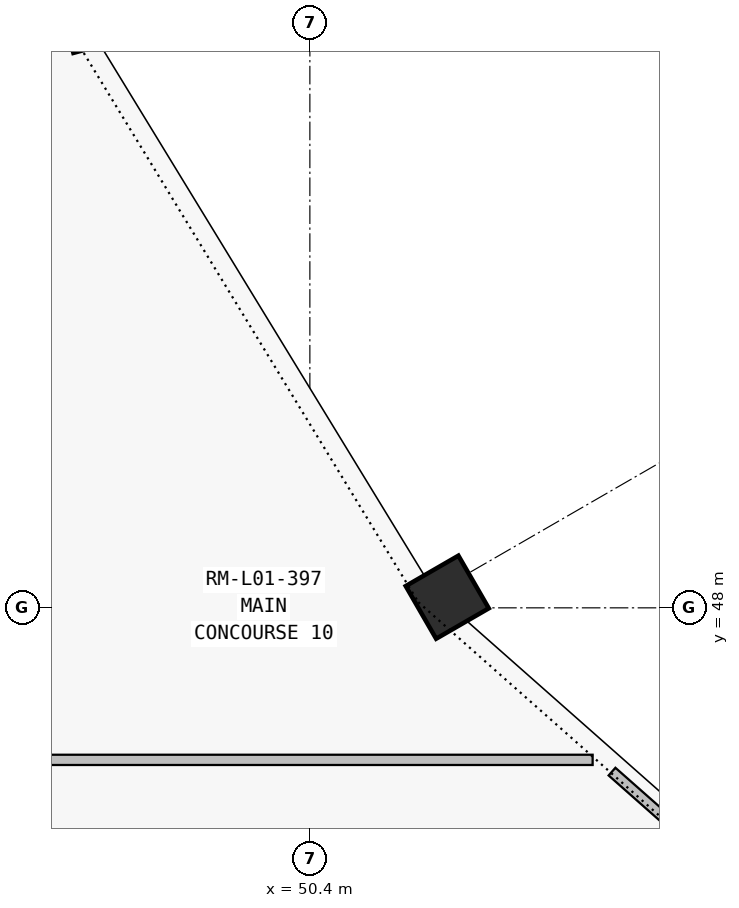
"""IFC4 building model, lengths in metres.
Left out: names, types, materials, properties, quantities, classifications, styles, units other than length and angle.
Written with IfcOpenShell. Run it as: python <this file> out.ifc"""

import sys

from ifc_helpers import new_model, si_unit, direction, frame, frame_2d, origin, origin_2d, place, context, subcontext, project, spatial, rectangle, extrude, element, save


model = new_model("IFC4")
c1 = context("Model", 3, precision=1e-05, world=origin(), true_north=direction((0.0, 1.0)))
c2 = subcontext(c1, "Body", "Model", "MODEL_VIEW")
j1 = project(units=[si_unit("LENGTHUNIT", "METRE"), si_unit("PLANEANGLEUNIT", "RADIAN")], contexts=[c1])
p1 = place(None, origin())
s1 = spatial("IfcSite", under=j1, at=p1, CompositionType="ELEMENT")
p2 = place(p1, origin())
s2 = spatial("IfcBuilding", under=s1, at=p2, CompositionType="ELEMENT")
p3 = place(p2, frame((0.0, 0.0, 5.4)))
s3 = spatial("IfcBuildingStorey", under=s2, at=p3, CompositionType="ELEMENT", Elevation=5.4)
for number, where, z_axis, x_axis in (
    (1, (47.571, 55.79, 0.0), (0.0, 0.0, 1.0), (-0.966, -0.259, 0.0)),
    (2, (52.208, 48.14, 0.0), (0.0, 0.0, 1.0), (-0.866, -0.5, 0.0)),
):
    element("IfcColumn", number, at=place(p3, frame(where, z_axis=z_axis, x_axis=x_axis)), inside=s3, PredefinedType="COLUMN", context=c2, shape_type="SweptSolid", body=[
        extrude(rectangle(XDim=0.8, YDim=0.8, at=origin_2d()), origin(), (0.0, 0.0, 1.0), 4.5),
    ])
p4 = place(p3, frame((46.685, 46.0, 0.0), z_axis=(0.0, 0.0, 1.0), x_axis=(1.0, 0.0, 0.0)))
e3 = element("IfcWall", 3, at=p4, inside=s3, PredefinedType="PARTITIONING", context=c2, shape_type="SweptSolid", body=[
    extrude(rectangle(XDim=7.436, YDim=0.135, at=frame_2d((3.718, 0.0))), origin(), (0.0, 0.0, 1.0), 3.682),
])
p5 = place(p3, frame((54.375, 45.845, 0.0), z_axis=(0.0, 0.0, 1.0), x_axis=(0.749487139649, -0.662018902677, 0.0)))
e4 = element("IfcWall", 4, at=p5, inside=s3, PredefinedType="PARTITIONING", context=c2, shape_type="SweptSolid", body=[
    extrude(rectangle(XDim=6.523, YDim=0.135, at=frame_2d((3.261, 0.0))), origin(), (0.0, 0.0, 1.0), 3.515),
])
save(model, sys.argv[1])
